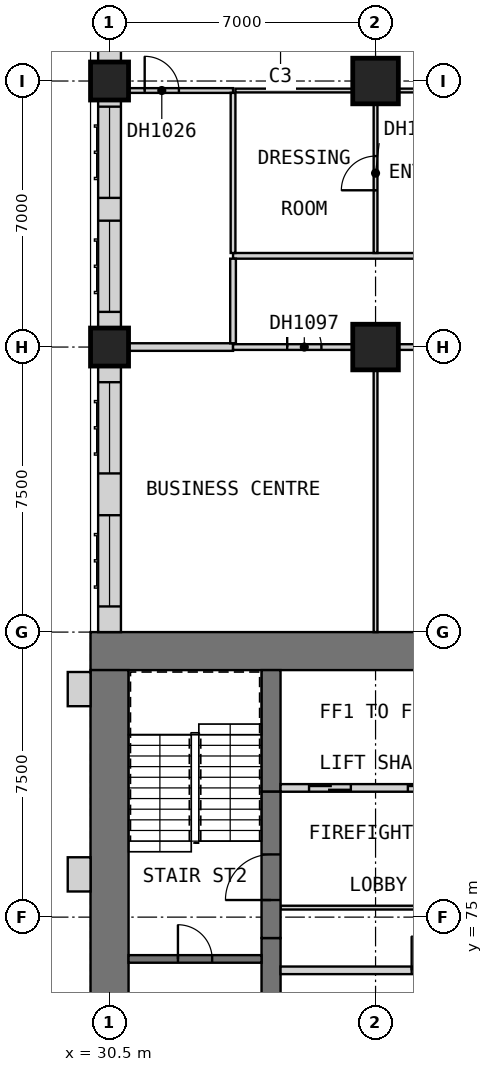
"""IFC4 building model, lengths in metres.
Left out: names, types, materials, properties, quantities, classifications, styles, units other than length and angle.
Written with IfcOpenShell. Run it as: python <this file> out.ifc"""

import sys

from ifc_helpers import new_model, si_unit, direction, frame, frame_2d, origin, origin_2d, place, context, subcontext, project, spatial, rectangle, extrude, element, fill, save


model = new_model("IFC4")
c1 = context("Model", 3, precision=1e-05, world=origin(), true_north=direction((0.0, 1.0)))
c2 = subcontext(c1, "Body", "Model", "MODEL_VIEW")
j1 = project(units=[si_unit("LENGTHUNIT", "METRE"), si_unit("PLANEANGLEUNIT", "RADIAN")], contexts=[c1])
p1 = place(None, origin())
s1 = spatial("IfcSite", under=j1, at=p1, CompositionType="ELEMENT")
p2 = place(p1, origin())
s2 = spatial("IfcBuilding", under=s1, at=p2, CompositionType="ELEMENT")
p3 = place(p2, frame((0.0, 0.0, 34.0)))
s3 = spatial("IfcBuildingStorey", under=s2, at=p3, CompositionType="ELEMENT", Elevation=34.0)
for number, where, z_axis, x_axis in (
    (1, (30.5, 90.0, 0.0), (0.0, 0.0, 1.0), (1.0, 0.0, 0.0)),
    (2, (30.5, 97.0, 0.0), (0.0, 0.0, 1.0), (1.0, 0.0, 0.0)),
):
    element("IfcColumn", number, at=place(p3, frame(where, z_axis=z_axis, x_axis=x_axis)), inside=s3, PredefinedType="COLUMN", context=c2, shape_type="SweptSolid", body=[
        extrude(rectangle(XDim=1.0, YDim=1.0, at=origin_2d()), origin(), (0.0, 0.0, 1.0), 3.6),
    ])
for number, where, z_axis, x_axis in (
    (3, (37.5, 90.0, 0.0), (0.0, 0.0, 1.0), (1.0, 0.0, 0.0)),
    (4, (37.5, 97.0, 0.0), (0.0, 0.0, 1.0), (1.0, 0.0, 0.0)),
):
    element("IfcColumn", number, at=place(p3, frame(where, z_axis=z_axis, x_axis=x_axis)), inside=s3, PredefinedType="COLUMN", context=c2, shape_type="SweptSolid", body=[
        extrude(rectangle(XDim=1.2, YDim=1.2, at=origin_2d()), origin(), (0.0, 0.0, 1.0), 3.6),
    ])
p4 = place(p3, frame((30.0, 82.0, 0.0), z_axis=(0.0, 0.0, 1.0), x_axis=(1.0, 0.0, 0.0)))
e5 = element("IfcWall", 5, at=p4, inside=s3, PredefinedType="SHEAR", context=c2, shape_type="SweptSolid", body=[
    extrude(rectangle(XDim=30.0, YDim=1.0, at=frame_2d((15.0, 0.0))), origin(), (0.0, 0.0, 1.0), 3.6),
])
p5 = place(p3, frame((30.5, 61.0, 0.0), z_axis=(0.0, 0.0, 1.0), x_axis=(0.0, 1.0, 0.0)))
e6 = element("IfcWall", 6, at=p5, inside=s3, PredefinedType="SHEAR", context=c2, shape_type="SweptSolid", body=[
    extrude(rectangle(XDim=20.5, YDim=1.0, at=frame_2d((10.25, 0.0))), origin(), (0.0, 0.0, 1.0), 3.6),
])
p6 = place(p3, frame((34.75, 68.05, 0.0), z_axis=(0.0, 0.0, 1.0), x_axis=(0.0, 1.0, 0.0)))
e7 = element("IfcWall", 7, at=p6, inside=s3, PredefinedType="SHEAR", context=c2, shape_type="SweptSolid", body=[
    extrude(rectangle(XDim=6.4, YDim=0.5, at=frame_2d((3.2, 0.0))), origin(), (0.0, 0.0, 1.0), 3.6),
])
p7 = place(p3, frame((34.75, 78.3, 0.0), z_axis=(0.0, 0.0, 1.0), x_axis=(0.0, 1.0, 0.0)))
e8 = element("IfcWall", 8, at=p7, inside=s3, PredefinedType="SHEAR", context=c2, shape_type="SweptSolid", body=[
    extrude(rectangle(XDim=3.2, YDim=0.5, at=frame_2d((1.6, 0.0))), origin(), (0.0, 0.0, 1.0), 3.6),
])
for number, where, z_axis, x_axis in (
    (9, (29.7, 75.675, 0.0), (0.0, 0.0, 1.0), (0.0, 1.0, 0.0)),
    (10, (29.7, 80.55, 0.0), (0.0, 0.0, 1.0), (0.0, 1.0, 0.0)),
):
    element("IfcWall", number, at=place(p3, frame(where, z_axis=z_axis, x_axis=x_axis)), inside=s3, PredefinedType="SOLIDWALL", context=c2, shape_type="SweptSolid", body=[
        extrude(rectangle(XDim=0.9, YDim=0.6, at=frame_2d((0.45, 0.0))), origin(), (0.0, 0.0, 1.0), 286.2),
    ])
p8 = place(p3, frame((30.5, 102.0, 0.0), z_axis=(0.0, 0.0, 1.0), x_axis=(0.0, -1.0, 0.0)))
e11 = element("IfcWall", 11, at=p8, inside=s3, PredefinedType="SOLIDWALL", context=c2, shape_type="SweptSolid", body=[
    extrude(rectangle(XDim=4.5, YDim=0.6, at=frame_2d((2.25, 0.0))), origin(), (0.0, 0.0, 1.0), 3.35),
])
p9 = place(p8, frame((1.5, 0.0, 0.8)))
e12 = element("IfcOpeningElement", 12, at=p9, cuts=e11, PredefinedType="OPENING", context=c2, shape_type="SweptSolid", body=[
    extrude(rectangle(XDim=2.4, YDim=1.8, at=frame_2d((1.2, 0.9))), frame((0.0, 0.31, 0.0), z_axis=(0.0, -1.0, 0.0), x_axis=(1.0, 0.0, 0.0)), (0.0, 0.0, 1.0), 0.62),
])
p10 = place(p3, frame((30.5, 96.5, 0.0), z_axis=(0.0, 0.0, 1.0), x_axis=(0.0, -1.0, 0.0)))
e13 = element("IfcWall", 13, at=p10, inside=s3, PredefinedType="SOLIDWALL", context=c2, shape_type="SweptSolid", body=[
    extrude(rectangle(XDim=6.0, YDim=0.6, at=frame_2d((3.0, 0.0))), origin(), (0.0, 0.0, 1.0), 2.85),
])
p11 = place(p10, frame((3.175, 0.0, 0.8)))
e14 = element("IfcOpeningElement", 14, at=p11, cuts=e13, PredefinedType="OPENING", context=c2, shape_type="SweptSolid", body=[
    extrude(rectangle(XDim=2.4, YDim=1.8, at=frame_2d((1.2, 0.9))), frame((0.0, 0.31, 0.0), z_axis=(0.0, -1.0, 0.0), x_axis=(1.0, 0.0, 0.0)), (0.0, 0.0, 1.0), 0.62),
])
p12 = place(p10, frame((0.175, 0.0, 0.8)))
e15 = element("IfcOpeningElement", 15, at=p12, cuts=e13, PredefinedType="OPENING", context=c2, shape_type="SweptSolid", body=[
    extrude(rectangle(XDim=2.4, YDim=1.8, at=frame_2d((1.2, 0.9))), frame((0.0, 0.31, 0.0), z_axis=(0.0, -1.0, 0.0), x_axis=(1.0, 0.0, 0.0)), (0.0, 0.0, 1.0), 0.62),
])
p13 = place(p3, frame((30.5, 89.5, 0.0), z_axis=(0.0, 0.0, 1.0), x_axis=(0.0, -1.0, 0.0)))
e16 = element("IfcWall", 16, at=p13, inside=s3, PredefinedType="SOLIDWALL", context=c2, shape_type="SweptSolid", body=[
    extrude(rectangle(XDim=7.0, YDim=0.6, at=frame_2d((3.5, 0.0))), origin(), (0.0, 0.0, 1.0), 3.35),
])
p14 = place(p13, frame((3.925, 0.0, 0.8)))
e17 = element("IfcOpeningElement", 17, at=p14, cuts=e16, PredefinedType="OPENING", context=c2, shape_type="SweptSolid", body=[
    extrude(rectangle(XDim=2.4, YDim=1.8, at=frame_2d((1.2, 0.9))), frame((0.0, 0.31, 0.0), z_axis=(0.0, -1.0, 0.0), x_axis=(1.0, 0.0, 0.0)), (0.0, 0.0, 1.0), 0.62),
])
p15 = place(p13, frame((0.425, 0.0, 0.8)))
e18 = element("IfcOpeningElement", 18, at=p15, cuts=e16, PredefinedType="OPENING", context=c2, shape_type="SweptSolid", body=[
    extrude(rectangle(XDim=2.4, YDim=1.8, at=frame_2d((1.2, 0.9))), frame((0.0, 0.31, 0.0), z_axis=(0.0, -1.0, 0.0), x_axis=(1.0, 0.0, 0.0)), (0.0, 0.0, 1.0), 0.62),
])
p16 = place(p3, frame((35.0, 73.6, 0.0), z_axis=(0.0, 0.0, 1.0), x_axis=(1.0, 0.0, 0.0)))
e19 = element("IfcWall", 19, at=p16, inside=s3, PredefinedType="PARTITIONING", context=c2, shape_type="SweptSolid", body=[
    extrude(rectangle(XDim=15.6, YDim=0.2, at=frame_2d((7.8, 0.0))), origin(), (0.0, 0.0, 1.0), 3.35),
])
p17 = place(p16, frame((3.45, 0.0, 0.0)))
e20 = element("IfcOpeningElement", 20, at=p17, cuts=e19, PredefinedType="OPENING", context=c2, shape_type="SweptSolid", body=[
    extrude(rectangle(XDim=0.9, YDim=2.1, at=frame_2d((0.45, 1.05))), frame((0.0, 0.11, 0.0), z_axis=(0.0, -1.0, 0.0), x_axis=(1.0, 0.0, 0.0)), (0.0, 0.0, 1.0), 0.22),
])
p18 = place(p16, frame((11.25, 0.0, 0.0)))
e21 = element("IfcOpeningElement", 21, at=p18, cuts=e19, PredefinedType="OPENING", context=c2, shape_type="SweptSolid", body=[
    extrude(rectangle(XDim=0.9, YDim=2.1, at=frame_2d((0.45, 1.05))), frame((0.0, 0.11, 0.0), z_axis=(0.0, -1.0, 0.0), x_axis=(1.0, 0.0, 0.0)), (0.0, 0.0, 1.0), 0.22),
])
p19 = place(p3, frame((35.0, 78.4, 0.0), z_axis=(0.0, 0.0, 1.0), x_axis=(1.0, 0.0, 0.0)))
e22 = element("IfcWall", 22, at=p19, inside=s3, PredefinedType="SOLIDWALL", context=c2, shape_type="SweptSolid", body=[
    extrude(rectangle(XDim=15.6, YDim=0.2, at=frame_2d((7.8, 0.0))), origin(), (0.0, 0.0, 1.0), 3.6),
])
p20 = place(p19, frame((0.75, 0.0, 0.0)))
e23 = element("IfcOpeningElement", 23, at=p20, cuts=e22, PredefinedType="OPENING", context=c2, shape_type="SweptSolid", body=[
    extrude(rectangle(XDim=1.1, YDim=2.1, at=frame_2d((0.55, 1.05))), frame((0.0, 0.11, 0.0), z_axis=(0.0, -1.0, 0.0), x_axis=(1.0, 0.0, 0.0)), (0.0, 0.0, 1.0), 0.22),
])
p21 = place(p19, frame((3.35, 0.0, 0.0)))
e24 = element("IfcOpeningElement", 24, at=p21, cuts=e22, PredefinedType="OPENING", context=c2, shape_type="SweptSolid", body=[
    extrude(rectangle(XDim=1.1, YDim=2.1, at=frame_2d((0.55, 1.05))), frame((0.0, 0.11, 0.0), z_axis=(0.0, -1.0, 0.0), x_axis=(1.0, 0.0, 0.0)), (0.0, 0.0, 1.0), 0.22),
])
p22 = place(p19, frame((11.15, 0.0, 0.0)))
e25 = element("IfcOpeningElement", 25, at=p22, cuts=e22, PredefinedType="OPENING", context=c2, shape_type="SweptSolid", body=[
    extrude(rectangle(XDim=1.1, YDim=2.1, at=frame_2d((0.55, 1.05))), frame((0.0, 0.11, 0.0), z_axis=(0.0, -1.0, 0.0), x_axis=(1.0, 0.0, 0.0)), (0.0, 0.0, 1.0), 0.22),
])
p23 = place(p19, frame((13.75, 0.0, 0.0)))
e26 = element("IfcOpeningElement", 26, at=p23, cuts=e22, PredefinedType="OPENING", context=c2, shape_type="SweptSolid", body=[
    extrude(rectangle(XDim=1.1, YDim=2.1, at=frame_2d((0.55, 1.05))), frame((0.0, 0.11, 0.0), z_axis=(0.0, -1.0, 0.0), x_axis=(1.0, 0.0, 0.0)), (0.0, 0.0, 1.0), 0.22),
])
p24 = place(p3, frame((35.0, 75.25, 0.0), z_axis=(0.0, 0.0, 1.0), x_axis=(1.0, 0.0, 0.0)))
e27 = element("IfcWall", 27, at=p24, inside=s3, PredefinedType="PARTITIONING", context=c2, shape_type="SweptSolid", body=[
    extrude(rectangle(XDim=5.25, YDim=0.1, at=frame_2d((2.625, 0.0))), origin(), (0.0, 0.0, 1.0), 3.35),
])
p25 = place(p3, frame((34.75, 74.45, 0.0), z_axis=(0.0, 0.0, 1.0), x_axis=(0.0, 1.0, 0.0)))
e28 = element("IfcWall", 28, at=p25, inside=s3, PredefinedType="SOLIDWALL", context=c2, shape_type="SweptSolid", body=[
    extrude(rectangle(XDim=3.85, YDim=0.5, at=frame_2d((1.925, 0.0))), origin(), (0.0, 0.0, 1.0), 2.4),
])
p26 = place(p25, frame((1.0, 0.0, 0.0)))
e29 = element("IfcOpeningElement", 29, at=p26, cuts=e28, PredefinedType="OPENING", context=c2, shape_type="SweptSolid", body=[
    extrude(rectangle(XDim=1.2, YDim=2.1, at=frame_2d((0.6, 1.05))), frame((0.0, 0.26, 0.0), z_axis=(0.0, -1.0, 0.0), x_axis=(1.0, 0.0, 0.0)), (0.0, 0.0, 1.0), 0.52),
])
p27 = place(p3, frame((31.0, 73.9, 0.0), z_axis=(0.0, 0.0, 1.0), x_axis=(1.0, 0.0, 0.0)))
e30 = element("IfcWall", 30, at=p27, inside=s3, PredefinedType="SOLIDWALL", context=c2, shape_type="SweptSolid", body=[
    extrude(rectangle(XDim=3.5, YDim=0.2, at=frame_2d((1.75, 0.0))), origin(), (0.0, 0.0, 1.0), 3.35),
])
p28 = place(p27, frame((1.3, 0.0, 0.0)))
e31 = element("IfcOpeningElement", 31, at=p28, cuts=e30, PredefinedType="OPENING", context=c2, shape_type="SweptSolid", body=[
    extrude(rectangle(XDim=0.9, YDim=2.1, at=frame_2d((0.45, 1.05))), frame((0.0, 0.11, 0.0), z_axis=(0.0, -1.0, 0.0), x_axis=(1.0, 0.0, 0.0)), (0.0, 0.0, 1.0), 0.22),
])
p29 = place(p3, frame((30.0, 90.0, 0.0), z_axis=(0.0, 0.0, 1.0), x_axis=(1.0, 0.0, 0.0)))
e32 = element("IfcWall", 32, at=p29, inside=s3, PredefinedType="PARTITIONING", context=c2, shape_type="SweptSolid", body=[
    extrude(rectangle(XDim=3.75, YDim=0.2, at=frame_2d((1.875, 0.0))), origin(), (0.0, 0.0, 1.0), 3.35),
])
p30 = place(p3, frame((33.75, 90.0, 0.0), z_axis=(0.0, 0.0, 1.0), x_axis=(1.0, 0.0, 0.0)))
e33 = element("IfcWall", 33, at=p30, inside=s3, PredefinedType="PARTITIONING", context=c2, shape_type="SweptSolid", body=[
    extrude(rectangle(XDim=41.25, YDim=0.15, at=frame_2d((20.625, 0.0))), origin(), (0.0, 0.0, 1.0), 3.35),
])
p31 = place(p30, frame((1.425, 0.0, 0.0)))
e34 = element("IfcOpeningElement", 34, at=p31, cuts=e33, PredefinedType="OPENING", context=c2, shape_type="SweptSolid", body=[
    extrude(rectangle(XDim=0.9, YDim=2.1, at=frame_2d((0.45, 1.05))), frame((0.0, 0.085, 0.0), z_axis=(0.0, -1.0, 0.0), x_axis=(1.0, 0.0, 0.0)), (0.0, 0.0, 1.0), 0.17),
])
p32 = place(p30, frame((12.45, 0.0, 0.0)))
e35 = element("IfcOpeningElement", 35, at=p32, cuts=e33, PredefinedType="OPENING", context=c2, shape_type="SweptSolid", body=[
    extrude(rectangle(XDim=0.9, YDim=2.1, at=frame_2d((0.45, 1.05))), frame((0.0, 0.085, 0.0), z_axis=(0.0, -1.0, 0.0), x_axis=(1.0, 0.0, 0.0)), (0.0, 0.0, 1.0), 0.17),
])
p33 = place(p3, frame((33.75, 92.4, 0.0), z_axis=(0.0, 0.0, 1.0), x_axis=(1.0, 0.0, 0.0)))
e36 = element("IfcWall", 36, at=p33, inside=s3, PredefinedType="PARTITIONING", context=c2, shape_type="SweptSolid", body=[
    extrude(rectangle(XDim=43.65, YDim=0.15, at=frame_2d((21.825, 0.0))), origin(), (0.0, 0.0, 1.0), 3.35),
])
p34 = place(p33, frame((5.175, 0.0, 0.0)))
e37 = element("IfcOpeningElement", 37, at=p34, cuts=e36, PredefinedType="OPENING", context=c2, shape_type="SweptSolid", body=[
    extrude(rectangle(XDim=0.9, YDim=2.1, at=frame_2d((0.45, 1.05))), frame((0.0, 0.085, 0.0), z_axis=(0.0, -1.0, 0.0), x_axis=(1.0, 0.0, 0.0)), (0.0, 0.0, 1.0), 0.17),
])
p35 = place(p33, frame((9.863, 0.0, 0.0)))
e38 = element("IfcOpeningElement", 38, at=p35, cuts=e36, PredefinedType="OPENING", context=c2, shape_type="SweptSolid", body=[
    extrude(rectangle(XDim=0.9, YDim=2.1, at=frame_2d((0.45, 1.05))), frame((0.0, 0.085, 0.0), z_axis=(0.0, -1.0, 0.0), x_axis=(1.0, 0.0, 0.0)), (0.0, 0.0, 1.0), 0.17),
])
p36 = place(p33, frame((13.613, 0.0, 0.0)))
e39 = element("IfcOpeningElement", 39, at=p36, cuts=e36, PredefinedType="OPENING", context=c2, shape_type="SweptSolid", body=[
    extrude(rectangle(XDim=0.9, YDim=2.1, at=frame_2d((0.45, 1.05))), frame((0.0, 0.085, 0.0), z_axis=(0.0, -1.0, 0.0), x_axis=(1.0, 0.0, 0.0)), (0.0, 0.0, 1.0), 0.17),
])
p37 = place(p33, frame((17.363, 0.0, 0.0)))
e40 = element("IfcOpeningElement", 40, at=p37, cuts=e36, PredefinedType="OPENING", context=c2, shape_type="SweptSolid", body=[
    extrude(rectangle(XDim=0.9, YDim=2.1, at=frame_2d((0.45, 1.05))), frame((0.0, 0.085, 0.0), z_axis=(0.0, -1.0, 0.0), x_axis=(1.0, 0.0, 0.0)), (0.0, 0.0, 1.0), 0.17),
])
p38 = place(p33, frame((21.113, 0.0, 0.0)))
e41 = element("IfcOpeningElement", 41, at=p38, cuts=e36, PredefinedType="OPENING", context=c2, shape_type="SweptSolid", body=[
    extrude(rectangle(XDim=0.9, YDim=2.1, at=frame_2d((0.45, 1.05))), frame((0.0, 0.085, 0.0), z_axis=(0.0, -1.0, 0.0), x_axis=(1.0, 0.0, 0.0)), (0.0, 0.0, 1.0), 0.17),
])
p39 = place(p33, frame((28.05, 0.0, 0.0)))
e42 = element("IfcOpeningElement", 42, at=p39, cuts=e36, PredefinedType="OPENING", context=c2, shape_type="SweptSolid", body=[
    extrude(rectangle(XDim=0.9, YDim=2.1, at=frame_2d((0.45, 1.05))), frame((0.0, 0.085, 0.0), z_axis=(0.0, -1.0, 0.0), x_axis=(1.0, 0.0, 0.0)), (0.0, 0.0, 1.0), 0.17),
])
p40 = place(p33, frame((32.363, 0.0, 0.0)))
e43 = element("IfcOpeningElement", 43, at=p40, cuts=e36, PredefinedType="OPENING", context=c2, shape_type="SweptSolid", body=[
    extrude(rectangle(XDim=0.9, YDim=2.1, at=frame_2d((0.45, 1.05))), frame((0.0, 0.085, 0.0), z_axis=(0.0, -1.0, 0.0), x_axis=(1.0, 0.0, 0.0)), (0.0, 0.0, 1.0), 0.17),
])
p41 = place(p33, frame((39.3, 0.0, 0.0)))
e44 = element("IfcOpeningElement", 44, at=p41, cuts=e36, PredefinedType="OPENING", context=c2, shape_type="SweptSolid", body=[
    extrude(rectangle(XDim=0.9, YDim=2.1, at=frame_2d((0.45, 1.05))), frame((0.0, 0.085, 0.0), z_axis=(0.0, -1.0, 0.0), x_axis=(1.0, 0.0, 0.0)), (0.0, 0.0, 1.0), 0.17),
])
p42 = place(p33, frame((42.0, 0.0, 0.0)))
e45 = element("IfcOpeningElement", 45, at=p42, cuts=e36, PredefinedType="OPENING", context=c2, shape_type="SweptSolid", body=[
    extrude(rectangle(XDim=0.9, YDim=2.1, at=frame_2d((0.45, 1.05))), frame((0.0, 0.085, 0.0), z_axis=(0.0, -1.0, 0.0), x_axis=(1.0, 0.0, 0.0)), (0.0, 0.0, 1.0), 0.17),
])
p43 = place(p3, frame((33.75, 90.1, 0.0), z_axis=(0.0, 0.0, 1.0), x_axis=(0.0, 1.0, 0.0)))
e46 = element("IfcWall", 46, at=p43, inside=s3, PredefinedType="PARTITIONING", context=c2, shape_type="SweptSolid", body=[
    extrude(rectangle(XDim=2.225, YDim=0.15, at=frame_2d((1.112, 0.0))), origin(), (0.0, 0.0, 1.0), 3.35),
])
p44 = place(p3, frame((33.812, 96.75, 0.0), z_axis=(0.0, 0.0, 1.0), x_axis=(1.0, 0.0, 0.0)))
e47 = element("IfcWall", 47, at=p44, inside=s3, PredefinedType="PARTITIONING", context=c2, shape_type="SweptSolid", body=[
    extrude(rectangle(XDim=7.337, YDim=0.1, at=frame_2d((3.669, 0.0))), origin(), (0.0, 0.0, 1.0), 3.35),
])
p45 = place(p44, frame((5.113, 0.0, 0.0)))
e48 = element("IfcOpeningElement", 48, at=p45, cuts=e47, PredefinedType="OPENING", context=c2, shape_type="SweptSolid", body=[
    extrude(rectangle(XDim=0.9, YDim=2.1, at=frame_2d((0.45, 1.05))), frame((0.0, 0.06, 0.0), z_axis=(0.0, -1.0, 0.0), x_axis=(1.0, 0.0, 0.0)), (0.0, 0.0, 1.0), 0.12),
])
p46 = place(p3, frame((37.5, 82.5, 0.0), z_axis=(0.0, 0.0, 1.0), x_axis=(0.0, 1.0, 0.0)))
e49 = element("IfcWall", 49, at=p46, inside=s3, PredefinedType="PARTITIONING", context=c2, shape_type="SweptSolid", body=[
    extrude(rectangle(XDim=7.425, YDim=0.1, at=frame_2d((3.712, 0.0))), origin(), (0.0, 0.0, 1.0), 3.35),
])
p47 = place(p3, frame((37.5, 92.475, 0.0), z_axis=(0.0, 0.0, 1.0), x_axis=(0.0, 1.0, 0.0)))
e50 = element("IfcWall", 50, at=p47, inside=s3, PredefinedType="PARTITIONING", context=c2, shape_type="SweptSolid", body=[
    extrude(rectangle(XDim=4.225, YDim=0.1, at=frame_2d((2.112, 0.0))), origin(), (0.0, 0.0, 1.0), 3.35),
])
p48 = place(p47, frame((1.65, 0.0, 0.0)))
e51 = element("IfcOpeningElement", 51, at=p48, cuts=e50, PredefinedType="OPENING", context=c2, shape_type="SweptSolid", body=[
    extrude(rectangle(XDim=0.9, YDim=2.1, at=frame_2d((0.45, 1.05))), frame((0.0, 0.06, 0.0), z_axis=(0.0, -1.0, 0.0), x_axis=(1.0, 0.0, 0.0)), (0.0, 0.0, 1.0), 0.12),
])
p49 = place(p3, frame((30.0, 96.75, 0.0), z_axis=(0.0, 0.0, 1.0), x_axis=(1.0, 0.0, 0.0)))
e52 = element("IfcWall", 52, at=p49, inside=s3, PredefinedType="PARTITIONING", context=c2, shape_type="SweptSolid", body=[
    extrude(rectangle(XDim=3.75, YDim=0.125, at=frame_2d((1.875, 0.0))), origin(), (0.0, 0.0, 1.0), 3.35),
])
p50 = place(p49, frame((1.425, 0.0, 0.0)))
e53 = element("IfcOpeningElement", 53, at=p50, cuts=e52, PredefinedType="OPENING", context=c2, shape_type="SweptSolid", body=[
    extrude(rectangle(XDim=0.9, YDim=2.1, at=frame_2d((0.45, 1.05))), frame((0.0, 0.073, 0.0), z_axis=(0.0, -1.0, 0.0), x_axis=(1.0, 0.0, 0.0)), (0.0, 0.0, 1.0), 0.145),
])
p51 = place(p3, frame((33.75, 92.475, 0.0), z_axis=(0.0, 0.0, 1.0), x_axis=(0.0, 1.0, 0.0)))
e54 = element("IfcWall", 54, at=p51, inside=s3, PredefinedType="PARTITIONING", context=c2, shape_type="SweptSolid", body=[
    extrude(rectangle(XDim=4.212, YDim=0.125, at=frame_2d((2.106, 0.0))), origin(), (0.0, 0.0, 1.0), 3.35),
])
p52 = place(p11, origin())
e55 = element("IfcWindow", 55, at=p52, inside=s3, PartitioningType="SINGLE_PANEL", PredefinedType="WINDOW", context=c2, shape_type="SweptSolid", body=[
    extrude(rectangle(XDim=2.4, YDim=1.8, at=frame_2d((1.2, 0.9))), frame((0.0, -0.07, 0.0), z_axis=(0.0, -1.0, 0.0), x_axis=(1.0, 0.0, 0.0)), (0.0, 0.0, 1.0), 0.06),
])
fill(e14, e55)
p53 = place(p12, origin())
e56 = element("IfcWindow", 56, at=p53, inside=s3, PartitioningType="SINGLE_PANEL", PredefinedType="WINDOW", context=c2, shape_type="SweptSolid", body=[
    extrude(rectangle(XDim=2.4, YDim=1.8, at=frame_2d((1.2, 0.9))), frame((0.0, -0.07, 0.0), z_axis=(0.0, -1.0, 0.0), x_axis=(1.0, 0.0, 0.0)), (0.0, 0.0, 1.0), 0.06),
])
fill(e15, e56)
p54 = place(p14, origin())
e57 = element("IfcWindow", 57, at=p54, inside=s3, PartitioningType="SINGLE_PANEL", PredefinedType="WINDOW", context=c2, shape_type="SweptSolid", body=[
    extrude(rectangle(XDim=2.4, YDim=1.8, at=frame_2d((1.2, 0.9))), frame((0.0, -0.07, 0.0), z_axis=(0.0, -1.0, 0.0), x_axis=(1.0, 0.0, 0.0)), (0.0, 0.0, 1.0), 0.06),
])
fill(e17, e57)
p55 = place(p15, origin())
e58 = element("IfcWindow", 58, at=p55, inside=s3, PartitioningType="SINGLE_PANEL", PredefinedType="WINDOW", context=c2, shape_type="SweptSolid", body=[
    extrude(rectangle(XDim=2.4, YDim=1.8, at=frame_2d((1.2, 0.9))), frame((0.0, -0.07, 0.0), z_axis=(0.0, -1.0, 0.0), x_axis=(1.0, 0.0, 0.0)), (0.0, 0.0, 1.0), 0.06),
])
fill(e18, e58)
p56 = place(p17, origin())
e59 = element("IfcDoor", 59, at=p56, inside=s3, OperationType="SINGLE_SWING_RIGHT", PredefinedType="DOOR", context=c2, shape_type="SweptSolid", body=[
    extrude(rectangle(XDim=0.9, YDim=2.1, at=frame_2d((0.45, 1.05))), frame((0.0, 0.025, 0.0), z_axis=(0.0, -1.0, 0.0), x_axis=(1.0, 0.0, 0.0)), (0.0, 0.0, 1.0), 0.05),
])
fill(e20, e59)
p57 = place(p20, origin())
e60 = element("IfcDoor", 60, at=p57, inside=s3, OperationType="DOUBLE_DOOR_SLIDING", PredefinedType="DOOR", context=c2, shape_type="SweptSolid", body=[
    extrude(rectangle(XDim=1.1, YDim=2.1, at=frame_2d((0.55, 1.05))), frame((0.0, 0.025, 0.0), z_axis=(0.0, -1.0, 0.0), x_axis=(1.0, 0.0, 0.0)), (0.0, 0.0, 1.0), 0.05),
])
fill(e23, e60)
p58 = place(p21, origin())
e61 = element("IfcDoor", 61, at=p58, inside=s3, OperationType="DOUBLE_DOOR_SLIDING", PredefinedType="DOOR", context=c2, shape_type="SweptSolid", body=[
    extrude(rectangle(XDim=1.1, YDim=2.1, at=frame_2d((0.55, 1.05))), frame((0.0, 0.025, 0.0), z_axis=(0.0, -1.0, 0.0), x_axis=(1.0, 0.0, 0.0)), (0.0, 0.0, 1.0), 0.05),
])
fill(e24, e61)
p59 = place(p26, origin())
e62 = element("IfcDoor", 62, at=p59, inside=s3, OperationType="SINGLE_SWING_RIGHT", PredefinedType="DOOR", context=c2, shape_type="SweptSolid", body=[
    extrude(rectangle(XDim=1.2, YDim=2.1, at=frame_2d((0.6, 1.05))), frame((0.0, 0.025, 0.0), z_axis=(0.0, -1.0, 0.0), x_axis=(1.0, 0.0, 0.0)), (0.0, 0.0, 1.0), 0.05),
])
fill(e29, e62)
p60 = place(p28, origin())
e63 = element("IfcDoor", 63, at=p60, inside=s3, OperationType="SINGLE_SWING_RIGHT", PredefinedType="DOOR", context=c2, shape_type="SweptSolid", body=[
    extrude(rectangle(XDim=0.9, YDim=2.1, at=frame_2d((0.45, 1.05))), frame((0.0, 0.025, 0.0), z_axis=(0.0, -1.0, 0.0), x_axis=(1.0, 0.0, 0.0)), (0.0, 0.0, 1.0), 0.05),
])
fill(e31, e63)
p61 = place(p50, origin())
e64 = element("IfcDoor", 64, at=p61, inside=s3, OperationType="SINGLE_SWING_RIGHT", PredefinedType="DOOR", context=c2, shape_type="SweptSolid", body=[
    extrude(rectangle(XDim=0.9, YDim=2.1, at=frame_2d((0.45, 1.05))), frame((0.0, 0.025, 0.0), z_axis=(0.0, -1.0, 0.0), x_axis=(1.0, 0.0, 0.0)), (0.0, 0.0, 1.0), 0.05),
])
fill(e53, e64)
p62 = place(p48, origin())
e65 = element("IfcDoor", 65, at=p62, inside=s3, OperationType="SINGLE_SWING_RIGHT", PredefinedType="DOOR", context=c2, shape_type="SweptSolid", body=[
    extrude(rectangle(XDim=0.9, YDim=2.1, at=frame_2d((0.45, 1.05))), frame((0.0, 0.025, 0.0), z_axis=(0.0, -1.0, 0.0), x_axis=(1.0, 0.0, 0.0)), (0.0, 0.0, 1.0), 0.05),
])
fill(e51, e65)
p63 = place(p31, origin())
e66 = element("IfcDoor", 66, at=p63, inside=s3, OperationType="SINGLE_SWING_RIGHT", PredefinedType="DOOR", context=c2, shape_type="SweptSolid", body=[
    extrude(rectangle(XDim=0.9, YDim=2.1, at=frame_2d((0.45, 1.05))), frame((0.0, 0.025, 0.0), z_axis=(0.0, -1.0, 0.0), x_axis=(1.0, 0.0, 0.0)), (0.0, 0.0, 1.0), 0.05),
])
fill(e34, e66)
save(model, sys.argv[1])
